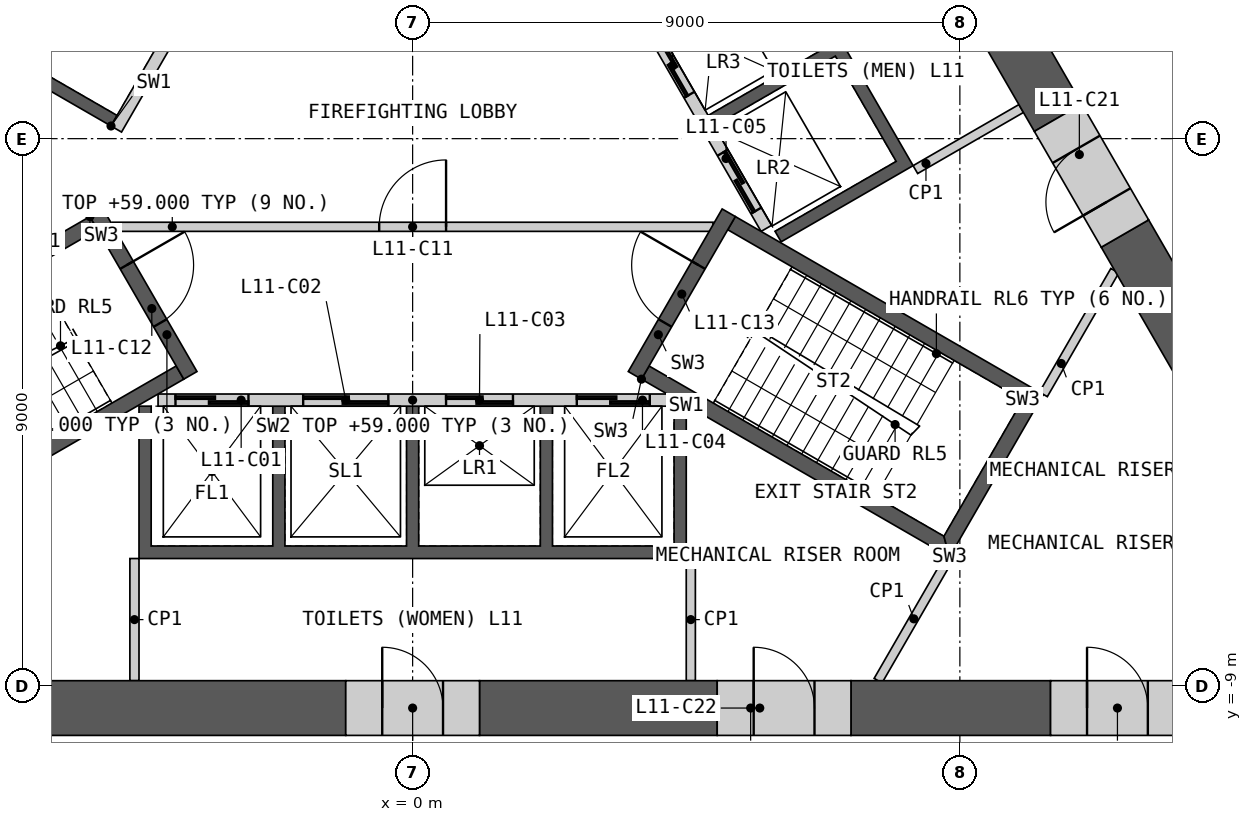
"""IFC4 building model, lengths in metres.
Left out: names, types, materials, properties, quantities, classifications, styles, units other than length and angle.
Written with IfcOpenShell. Run it as: python <this file> out.ifc"""

import sys

from ifc_helpers import new_model, si_unit, direction, frame, frame_2d, origin, place, context, subcontext, project, spatial, polyline, rectangle, outline, extrude, element, fill, save


model = new_model("IFC4")
c1 = context("Model", 3, precision=1e-05, world=origin(), true_north=direction((0.0, 1.0)))
c2 = subcontext(c1, "Body", "Model", "MODEL_VIEW")
j1 = project(units=[si_unit("LENGTHUNIT", "METRE"), si_unit("PLANEANGLEUNIT", "RADIAN")], contexts=[c1])
p1 = place(None, origin())
s1 = spatial("IfcSite", under=j1, at=p1, CompositionType="ELEMENT")
p2 = place(p1, origin())
s2 = spatial("IfcBuilding", under=s1, at=p2, CompositionType="ELEMENT")
p3 = place(p2, frame((0.0, 0.0, 55.2)))
s3 = spatial("IfcBuildingStorey", under=s2, at=p3, CompositionType="ELEMENT", Elevation=55.2)
p4 = place(p3, origin())
e1 = element("IfcWall", 1, at=p4, inside=s3, PredefinedType="SHEAR", context=c2, shape_type="SweptSolid", body=[
    extrude(outline(polyline([(4.5, -4.4), (4.5, -6.906), (-4.5, -6.906), (-4.5, -4.4), (-4.3, -4.4), (-4.3, -6.7), (-2.3, -6.7), (-2.3, -4.4), (-2.1, -4.4), (-2.1, -6.7), (-0.1, -6.7), (-0.1, -4.4), (0.1, -4.4), (0.1, -6.7), (2.1, -6.7), (2.1, -4.4), (2.3, -4.4), (2.3, -6.7), (4.3, -6.7), (4.3, -4.4), (4.5, -4.4)])), origin(), (0.0, 0.0, 1.0), 3.8),
])
p5 = place(p3, frame((-4.187, -4.3, 0.0), z_axis=(0.0, 0.0, 1.0), x_axis=(1.0, 0.0, 0.0)))
e2 = element("IfcWall", 2, at=p5, inside=s3, PredefinedType="SOLIDWALL", context=c2, shape_type="SweptSolid", body=[
    extrude(rectangle(XDim=8.373, YDim=0.2, at=frame_2d((4.187, 0.0))), origin(), (0.0, 0.0, 1.0), 3.8),
])
p6 = place(p5, frame((0.287, 0.0, 0.0)))
e3 = element("IfcOpeningElement", 3, at=p6, cuts=e2, PredefinedType="OPENING", context=c2, shape_type="SweptSolid", body=[
    extrude(rectangle(XDim=1.2, YDim=2.1, at=frame_2d((0.6, 1.05))), frame((0.0, 0.11, 0.0), z_axis=(0.0, -1.0, 0.0), x_axis=(1.0, 0.0, 0.0)), (0.0, 0.0, 1.0), 0.22),
])
p7 = place(p5, frame((2.387, 0.0, 0.0)))
e4 = element("IfcOpeningElement", 4, at=p7, cuts=e2, PredefinedType="OPENING", context=c2, shape_type="SweptSolid", body=[
    extrude(rectangle(XDim=1.4, YDim=2.1, at=frame_2d((0.7, 1.05))), frame((0.0, 0.11, 0.0), z_axis=(0.0, -1.0, 0.0), x_axis=(1.0, 0.0, 0.0)), (0.0, 0.0, 1.0), 0.22),
])
p8 = place(p5, frame((4.737, 0.0, 0.0)))
e5 = element("IfcOpeningElement", 5, at=p8, cuts=e2, PredefinedType="OPENING", context=c2, shape_type="SweptSolid", body=[
    extrude(rectangle(XDim=1.1, YDim=2.1, at=frame_2d((0.55, 1.05))), frame((0.0, 0.11, 0.0), z_axis=(0.0, -1.0, 0.0), x_axis=(1.0, 0.0, 0.0)), (0.0, 0.0, 1.0), 0.22),
])
p9 = place(p5, frame((6.887, 0.0, 0.0)))
e6 = element("IfcOpeningElement", 6, at=p9, cuts=e2, PredefinedType="OPENING", context=c2, shape_type="SweptSolid", body=[
    extrude(rectangle(XDim=1.2, YDim=2.1, at=frame_2d((0.6, 1.05))), frame((0.0, 0.11, 0.0), z_axis=(0.0, -1.0, 0.0), x_axis=(1.0, 0.0, 0.0)), (0.0, 0.0, 1.0), 0.22),
])
p10 = place(p3, origin())
e7 = element("IfcWall", 7, at=p10, inside=s3, PredefinedType="SHEAR", context=c2, shape_type="SweptSolid", body=[
    extrude(outline(polyline([(2.66, 4.192), (4.831, 5.445), (8.231, -0.444), (6.061, -1.697), (5.96, -1.524), (7.952, -0.374), (6.952, 1.358), (4.96, 0.208), (4.861, 0.381), (6.852, 1.531), (5.852, 3.263), (3.861, 2.113), (3.76, 2.287), (5.752, 3.437), (4.752, 5.169), (2.76, 4.019), (2.66, 4.192)])), origin(), (0.0, 0.0, 1.0), 3.8),
])
p11 = place(p3, frame((5.817, -1.476, 0.0), z_axis=(0.0, 0.0, 1.0), x_axis=(-0.500002616675, 0.866023893041, 0.0)))
e8 = element("IfcWall", 8, at=p11, inside=s3, PredefinedType="SOLIDWALL", context=c2, shape_type="SweptSolid", body=[
    extrude(rectangle(XDim=8.373, YDim=0.2, at=frame_2d((4.187, 0.0))), origin(), (0.0, 0.0, 1.0), 3.8),
])
p12 = place(p11, frame((0.337, 0.0, 0.0)))
e9 = element("IfcOpeningElement", 9, at=p12, cuts=e8, PredefinedType="OPENING", context=c2, shape_type="SweptSolid", body=[
    extrude(rectangle(XDim=1.1, YDim=2.1, at=frame_2d((0.55, 1.05))), frame((0.0, 0.11, 0.0), z_axis=(0.0, -1.0, 0.0), x_axis=(1.0, 0.0, 0.0)), (0.0, 0.0, 1.0), 0.22),
])
p13 = place(p11, frame((2.537, 0.0, 0.0)))
e10 = element("IfcOpeningElement", 10, at=p13, cuts=e8, PredefinedType="OPENING", context=c2, shape_type="SweptSolid", body=[
    extrude(rectangle(XDim=1.1, YDim=2.1, at=frame_2d((0.55, 1.05))), frame((0.0, 0.11, 0.0), z_axis=(0.0, -1.0, 0.0), x_axis=(1.0, 0.0, 0.0)), (0.0, 0.0, 1.0), 0.22),
])
p14 = place(p11, frame((4.737, 0.0, 0.0)))
e11 = element("IfcOpeningElement", 11, at=p14, cuts=e8, PredefinedType="OPENING", context=c2, shape_type="SweptSolid", body=[
    extrude(rectangle(XDim=1.1, YDim=2.1, at=frame_2d((0.55, 1.05))), frame((0.0, 0.11, 0.0), z_axis=(0.0, -1.0, 0.0), x_axis=(1.0, 0.0, 0.0)), (0.0, 0.0, 1.0), 0.22),
])
p15 = place(p11, frame((7.037, 0.0, 0.0)))
e12 = element("IfcOpeningElement", 12, at=p15, cuts=e8, PredefinedType="OPENING", context=c2, shape_type="SweptSolid", body=[
    extrude(rectangle(XDim=0.9, YDim=2.1, at=frame_2d((0.45, 1.05))), frame((0.0, 0.11, 0.0), z_axis=(0.0, -1.0, 0.0), x_axis=(1.0, 0.0, 0.0)), (0.0, 0.0, 1.0), 0.22),
])
p16 = place(p3, origin())
e13 = element("IfcWall", 13, at=p16, inside=s3, PredefinedType="SHEAR", context=c2, shape_type="SweptSolid", body=[
    extrude(outline(polyline([(-4.96, 0.208), (-7.131, 1.461), (-5.931, 3.54), (-3.76, 2.287), (-3.861, 2.113), (-5.852, 3.263), (-6.852, 1.531), (-4.861, 0.381), (-4.96, 0.208)])), origin(), (0.0, 0.0, 1.0), 3.8),
])
p17 = place(p3, frame((-1.631, 5.776, 0.0), z_axis=(0.0, 0.0, 1.0), x_axis=(-0.499992876559, -0.866029516466, 0.0)))
e14 = element("IfcWall", 14, at=p17, inside=s3, PredefinedType="SOLIDWALL", context=c2, shape_type="SweptSolid", body=[
    extrude(rectangle(XDim=6.486, YDim=0.2, at=frame_2d((3.243, 0.0))), origin(), (0.0, 0.0, 1.0), 3.8),
])
p18 = place(p17, frame((0.437, 0.0, 0.0)))
e15 = element("IfcOpeningElement", 15, at=p18, cuts=e14, PredefinedType="OPENING", context=c2, shape_type="SweptSolid", body=[
    extrude(rectangle(XDim=0.9, YDim=2.1, at=frame_2d((0.45, 1.05))), frame((0.0, 0.11, 0.0), z_axis=(0.0, -1.0, 0.0), x_axis=(1.0, 0.0, 0.0)), (0.0, 0.0, 1.0), 0.22),
])
p19 = place(p17, frame((2.637, 0.0, 0.0)))
e16 = element("IfcOpeningElement", 16, at=p19, cuts=e14, PredefinedType="OPENING", context=c2, shape_type="SweptSolid", body=[
    extrude(rectangle(XDim=0.9, YDim=2.1, at=frame_2d((0.45, 1.05))), frame((0.0, 0.11, 0.0), z_axis=(0.0, -1.0, 0.0), x_axis=(1.0, 0.0, 0.0)), (0.0, 0.0, 1.0), 0.22),
])
p20 = place(p3, frame((-4.941, -1.45, 0.0), z_axis=(0.0, 0.0, 1.0), x_axis=(1.0, 0.0, 0.0)))
e17 = element("IfcWall", 17, at=p20, inside=s3, PredefinedType="PARTITIONING", context=c2, shape_type="SweptSolid", body=[
    extrude(rectangle(XDim=9.882, YDim=0.15, at=frame_2d((4.941, 0.0))), origin(), (0.0, 0.0, 1.0), 3.8),
])
p21 = place(p20, frame((4.391, 0.0, 0.0)))
e18 = element("IfcOpeningElement", 18, at=p21, cuts=e17, PredefinedType="OPENING", context=c2, shape_type="SweptSolid", body=[
    extrude(rectangle(XDim=1.1, YDim=2.1, at=frame_2d((0.55, 1.05))), frame((0.0, 0.085, 0.0), z_axis=(0.0, -1.0, 0.0), x_axis=(1.0, 0.0, 0.0)), (0.0, 0.0, 1.0), 0.17),
])
p22 = place(p3, origin())
e19 = element("IfcWall", 19, at=p22, inside=s3, PredefinedType="SHEAR", context=c2, shape_type="SweptSolid", body=[
    extrude(outline(polyline([(-5.307, -1.281), (-10.374, -4.206), (-10.032, -4.298), (-5.182, -1.498), (-5.307, -1.281)])), origin(), (0.0, 0.0, 1.0), 3.8),
])
p23 = place(p3, origin())
e20 = element("IfcWall", 20, at=p23, inside=s3, PredefinedType="SHEAR", context=c2, shape_type="SweptSolid", body=[
    extrude(outline(polyline([(-8.738, -6.539), (-8.83, -6.881), (-3.763, -3.956), (-3.888, -3.739), (-8.738, -6.539)])), origin(), (0.0, 0.0, 1.0), 3.8),
])
p24 = place(p3, frame((-5.199, -1.219, 0.0), z_axis=(0.0, 0.0, 1.0), x_axis=(0.499982516597, -0.866035497597, 0.0)))
e21 = element("IfcWall", 21, at=p24, inside=s3, PredefinedType="SHEAR", context=c2, shape_type="SweptSolid", body=[
    extrude(rectangle(XDim=3.088, YDim=0.25, at=frame_2d((1.544, 0.0))), origin(), (0.0, 0.0, 1.0), 3.8),
])
p25 = place(p24, frame((0.994, 0.0, 0.0)))
e22 = element("IfcOpeningElement", 22, at=p25, cuts=e21, PredefinedType="OPENING", context=c2, shape_type="SweptSolid", body=[
    extrude(rectangle(XDim=1.1, YDim=2.1, at=frame_2d((0.55, 1.05))), frame((0.0, 0.135, 0.0), z_axis=(0.0, -1.0, 0.0), x_axis=(1.0, 0.0, 0.0)), (0.0, 0.0, 1.0), 0.27),
])
p26 = place(p3, origin())
e23 = element("IfcWall", 23, at=p26, inside=s3, PredefinedType="SHEAR", context=c2, shape_type="SweptSolid", body=[
    extrude(outline(polyline([(3.763, -3.956), (8.83, -6.881), (8.738, -6.539), (3.888, -3.739), (3.763, -3.956)])), origin(), (0.0, 0.0, 1.0), 3.8),
])
p27 = place(p3, origin())
e24 = element("IfcWall", 24, at=p27, inside=s3, PredefinedType="SHEAR", context=c2, shape_type="SweptSolid", body=[
    extrude(outline(polyline([(8.83, -6.881), (10.374, -4.206), (10.032, -4.298), (8.738, -6.539), (8.83, -6.881)])), origin(), (0.0, 0.0, 1.0), 3.8),
])
p28 = place(p3, origin())
e25 = element("IfcWall", 25, at=p28, inside=s3, PredefinedType="SHEAR", context=c2, shape_type="SweptSolid", body=[
    extrude(outline(polyline([(10.032, -4.298), (10.374, -4.206), (5.307, -1.281), (5.182, -1.498), (10.032, -4.298)])), origin(), (0.0, 0.0, 1.0), 3.8),
])
p29 = place(p3, frame((3.655, -3.893, 0.0), z_axis=(0.0, 0.0, 1.0), x_axis=(0.499982516597, 0.866035497597, 0.0)))
e26 = element("IfcWall", 26, at=p29, inside=s3, PredefinedType="SHEAR", context=c2, shape_type="SweptSolid", body=[
    extrude(rectangle(XDim=3.088, YDim=0.25, at=frame_2d((1.544, 0.0))), origin(), (0.0, 0.0, 1.0), 3.8),
])
p30 = place(p29, frame((0.994, 0.0, 0.0)))
e27 = element("IfcOpeningElement", 27, at=p30, cuts=e26, PredefinedType="OPENING", context=c2, shape_type="SweptSolid", body=[
    extrude(rectangle(XDim=1.1, YDim=2.1, at=frame_2d((0.55, 1.05))), frame((0.0, 0.135, 0.0), z_axis=(0.0, -1.0, 0.0), x_axis=(1.0, 0.0, 0.0)), (0.0, 0.0, 1.0), 0.27),
])
for number, where, z_axis, x_axis in (
    (28, (4.575, -6.906, 0.0), (0.0, 0.0, 1.0), (0.0, -1.0, 0.0)),
    (29, (-4.575, -6.906, 0.0), (0.0, 0.0, 1.0), (0.0, -1.0, 0.0)),
):
    element("IfcWall", number, at=place(p3, frame(where, z_axis=z_axis, x_axis=x_axis)), inside=s3, PredefinedType="PARTITIONING", context=c2, shape_type="SweptSolid", body=[
        extrude(rectangle(XDim=2.009, YDim=0.15, at=frame_2d((1.004, 0.0))), origin(), (0.0, 0.0, 1.0), 3.8),
    ])
p31 = place(p3, frame((8.268, -0.509, 0.0), z_axis=(0.0, 0.0, 1.0), x_axis=(0.866035824272, 0.499981950752, 0.0)))
e30 = element("IfcWall", 30, at=p31, inside=s3, PredefinedType="PARTITIONING", context=c2, shape_type="SweptSolid", body=[
    extrude(rectangle(XDim=2.009, YDim=0.15, at=frame_2d((1.004, 0.0))), origin(), (0.0, 0.0, 1.0), 3.8),
])
p32 = place(p3, frame((8.83, -6.881, 0.0), z_axis=(0.0, 0.0, 1.0), x_axis=(-0.500073279432, -0.865983091751, 0.0)))
e31 = element("IfcWall", 31, at=p32, inside=s3, PredefinedType="PARTITIONING", context=c2, shape_type="SweptSolid", body=[
    extrude(rectangle(XDim=2.349, YDim=0.15, at=frame_2d((1.175, 0.0))), origin(), (0.0, 0.0, 1.0), 3.8),
])
p33 = place(p3, frame((10.374, -4.206, 0.0), z_axis=(0.0, 0.0, 1.0), x_axis=(0.499995339376, 0.86602809458, 0.0)))
e32 = element("IfcWall", 32, at=p33, inside=s3, PredefinedType="PARTITIONING", context=c2, shape_type="SweptSolid", body=[
    extrude(rectangle(XDim=2.349, YDim=0.15, at=frame_2d((1.175, 0.0))), origin(), (0.0, 0.0, 1.0), 3.8),
])
p34 = place(p3, frame((-15.441, -9.365, 0.0), z_axis=(0.0, 0.0, 1.0), x_axis=(1.0, 0.0, 0.0)))
e33 = element("IfcWall", 33, at=p34, inside=s3, PredefinedType="SHEAR", context=c2, shape_type="SweptSolid", body=[
    extrude(rectangle(XDim=14.341, YDim=0.9, at=frame_2d((7.17, 0.0))), origin(), (0.0, 0.0, 1.0), 3.8),
])
p35 = place(p3, frame((1.1, -9.365, 0.0), z_axis=(0.0, 0.0, 1.0), x_axis=(1.0, 0.0, 0.0)))
e34 = element("IfcWall", 34, at=p35, inside=s3, PredefinedType="SHEAR", context=c2, shape_type="SweptSolid", body=[
    extrude(rectangle(XDim=3.909, YDim=0.9, at=frame_2d((1.955, 0.0))), origin(), (0.0, 0.0, 1.0), 3.8),
])
p36 = place(p3, frame((7.209, -9.365, 0.0), z_axis=(0.0, 0.0, 1.0), x_axis=(1.0, 0.0, 0.0)))
e35 = element("IfcWall", 35, at=p36, inside=s3, PredefinedType="SHEAR", context=c2, shape_type="SweptSolid", body=[
    extrude(rectangle(XDim=3.282, YDim=0.9, at=frame_2d((1.641, 0.0))), origin(), (0.0, 0.0, 1.0), 3.8),
])
p37 = place(p3, frame((15.831, -8.69, 0.0), z_axis=(0.0, 0.0, 1.0), x_axis=(-0.499995435471, 0.8660280391, 0.0)))
e36 = element("IfcWall", 36, at=p37, inside=s3, PredefinedType="SHEAR", context=c2, shape_type="SweptSolid", body=[
    extrude(rectangle(XDim=8.232, YDim=0.9, at=frame_2d((4.116, 0.0))), origin(), (0.0, 0.0, 1.0), 3.8),
])
p38 = place(p3, frame((10.615, 0.344, 0.0), z_axis=(0.0, 0.0, 1.0), x_axis=(-0.500044870432, 0.865999496279, 0.0)))
e37 = element("IfcWall", 37, at=p38, inside=s3, PredefinedType="SHEAR", context=c2, shape_type="SweptSolid", body=[
    extrude(rectangle(XDim=2.709, YDim=0.9, at=frame_2d((1.354, 0.0))), origin(), (0.0, 0.0, 1.0), 3.8),
])
p39 = place(p3, frame((-1.1, -9.365, 0.0), z_axis=(0.0, 0.0, 1.0), x_axis=(1.0, 0.0, 0.0)))
e38 = element("IfcWall", 38, at=p39, inside=s3, PredefinedType="SHEAR", context=c2, shape_type="SweptSolid", body=[
    extrude(rectangle(XDim=2.2, YDim=0.9, at=frame_2d((1.1, 0.0))), origin(), (0.0, 0.0, 1.0), 3.8),
])
p40 = place(p39, frame((0.6, 0.0, 0.0)))
e39 = element("IfcOpeningElement", 39, at=p40, cuts=e38, PredefinedType="OPENING", context=c2, shape_type="SweptSolid", body=[
    extrude(rectangle(XDim=1.0, YDim=2.1, at=frame_2d((0.5, 1.05))), frame((0.0, 0.46, 0.0), z_axis=(0.0, -1.0, 0.0), x_axis=(1.0, 0.0, 0.0)), (0.0, 0.0, 1.0), 0.92),
])
p41 = place(p3, frame((10.491, -9.365, 0.0), z_axis=(0.0, 0.0, 1.0), x_axis=(1.0, 0.0, 0.0)))
e40 = element("IfcWall", 40, at=p41, inside=s3, PredefinedType="SHEAR", context=c2, shape_type="SweptSolid", body=[
    extrude(rectangle(XDim=2.2, YDim=0.9, at=frame_2d((1.1, 0.0))), origin(), (0.0, 0.0, 1.0), 3.8),
])
p42 = place(p41, frame((0.6, 0.0, 0.0)))
e41 = element("IfcOpeningElement", 41, at=p42, cuts=e40, PredefinedType="OPENING", context=c2, shape_type="SweptSolid", body=[
    extrude(rectangle(XDim=1.0, YDim=2.1, at=frame_2d((0.5, 1.05))), frame((0.0, 0.46, 0.0), z_axis=(0.0, -1.0, 0.0), x_axis=(1.0, 0.0, 0.0)), (0.0, 0.0, 1.0), 0.92),
])
p43 = place(p3, frame((11.715, -1.561, 0.0), z_axis=(0.0, 0.0, 1.0), x_axis=(-0.499946605688, 0.86605622881, 0.0)))
e42 = element("IfcWall", 42, at=p43, inside=s3, PredefinedType="SHEAR", context=c2, shape_type="SweptSolid", body=[
    extrude(rectangle(XDim=2.2, YDim=0.9, at=frame_2d((1.1, 0.0))), origin(), (0.0, 0.0, 1.0), 3.8),
])
p44 = place(p43, frame((0.6, 0.0, 0.0)))
e43 = element("IfcOpeningElement", 43, at=p44, cuts=e42, PredefinedType="OPENING", context=c2, shape_type="SweptSolid", body=[
    extrude(rectangle(XDim=1.0, YDim=2.1, at=frame_2d((0.5, 1.05))), frame((0.0, 0.46, 0.0), z_axis=(0.0, -1.0, 0.0), x_axis=(1.0, 0.0, 0.0)), (0.0, 0.0, 1.0), 0.92),
])
p45 = place(p3, frame((5.009, -9.365, 0.0), z_axis=(0.0, 0.0, 1.0), x_axis=(1.0, 0.0, 0.0)))
e44 = element("IfcWall", 44, at=p45, inside=s3, PredefinedType="SHEAR", context=c2, shape_type="SweptSolid", body=[
    extrude(rectangle(XDim=2.2, YDim=0.9, at=frame_2d((1.1, 0.0))), origin(), (0.0, 0.0, 1.0), 3.8),
])
p46 = place(p45, frame((0.6, 0.0, 0.0)))
e45 = element("IfcOpeningElement", 45, at=p46, cuts=e44, PredefinedType="OPENING", context=c2, shape_type="SweptSolid", body=[
    extrude(rectangle(XDim=1.0, YDim=2.1, at=frame_2d((0.5, 1.05))), frame((0.0, 0.46, 0.0), z_axis=(0.0, -1.0, 0.0), x_axis=(1.0, 0.0, 0.0)), (0.0, 0.0, 1.0), 0.92),
])
p47 = place(p3, frame((10.719, 5.865, 0.0), z_axis=(0.0, 0.0, 1.0), x_axis=(0.49999175339, -0.866030164915, 0.0)))
e46 = element("IfcWall", 46, at=p47, inside=s3, PredefinedType="PARTITIONING", context=c2, shape_type="SweptSolid", body=[
    extrude(rectangle(XDim=10.019, YDim=0.2, at=frame_2d((5.009, 0.0))), origin(), (0.0, 0.0, 1.0), 3.8),
])
p48 = place(p47, frame((4.585, 0.0, 0.0)))
e47 = element("IfcOpeningElement", 47, at=p48, cuts=e46, PredefinedType="OPENING", context=c2, shape_type="SweptSolid", body=[
    extrude(rectangle(XDim=0.95, YDim=2.1, at=frame_2d((0.475, 1.05))), frame((0.0, 0.11, 0.0), z_axis=(0.0, -1.0, 0.0), x_axis=(1.0, 0.0, 0.0)), (0.0, 0.0, 1.0), 0.22),
])
p49 = place(p6, origin())
e48 = element("IfcDoor", 48, at=p49, inside=s3, OperationType="SLIDING_TO_LEFT", PredefinedType="DOOR", context=c2, shape_type="SweptSolid", body=[
    extrude(rectangle(XDim=1.2, YDim=2.1, at=frame_2d((0.6, 1.05))), frame((0.0, 0.025, 0.0), z_axis=(0.0, -1.0, 0.0), x_axis=(1.0, 0.0, 0.0)), (0.0, 0.0, 1.0), 0.05),
])
fill(e3, e48)
p50 = place(p7, origin())
e49 = element("IfcDoor", 49, at=p50, inside=s3, OperationType="SLIDING_TO_LEFT", PredefinedType="DOOR", context=c2, shape_type="SweptSolid", body=[
    extrude(rectangle(XDim=1.4, YDim=2.1, at=frame_2d((0.7, 1.05))), frame((0.0, 0.025, 0.0), z_axis=(0.0, -1.0, 0.0), x_axis=(1.0, 0.0, 0.0)), (0.0, 0.0, 1.0), 0.05),
])
fill(e4, e49)
p51 = place(p8, origin())
e50 = element("IfcDoor", 50, at=p51, inside=s3, OperationType="SLIDING_TO_LEFT", PredefinedType="DOOR", context=c2, shape_type="SweptSolid", body=[
    extrude(rectangle(XDim=1.1, YDim=2.1, at=frame_2d((0.55, 1.05))), frame((0.0, 0.025, 0.0), z_axis=(0.0, -1.0, 0.0), x_axis=(1.0, 0.0, 0.0)), (0.0, 0.0, 1.0), 0.05),
])
fill(e5, e50)
p52 = place(p9, origin())
e51 = element("IfcDoor", 51, at=p52, inside=s3, OperationType="SLIDING_TO_LEFT", PredefinedType="DOOR", context=c2, shape_type="SweptSolid", body=[
    extrude(rectangle(XDim=1.2, YDim=2.1, at=frame_2d((0.6, 1.05))), frame((0.0, 0.025, 0.0), z_axis=(0.0, -1.0, 0.0), x_axis=(1.0, 0.0, 0.0)), (0.0, 0.0, 1.0), 0.05),
])
fill(e6, e51)
p53 = place(p12, origin())
e52 = element("IfcDoor", 52, at=p53, inside=s3, OperationType="SLIDING_TO_LEFT", PredefinedType="DOOR", context=c2, shape_type="SweptSolid", body=[
    extrude(rectangle(XDim=1.1, YDim=2.1, at=frame_2d((0.55, 1.05))), frame((0.0, 0.025, 0.0), z_axis=(0.0, -1.0, 0.0), x_axis=(1.0, 0.0, 0.0)), (0.0, 0.0, 1.0), 0.05),
])
fill(e9, e52)
p54 = place(p13, origin())
e53 = element("IfcDoor", 53, at=p54, inside=s3, OperationType="SLIDING_TO_LEFT", PredefinedType="DOOR", context=c2, shape_type="SweptSolid", body=[
    extrude(rectangle(XDim=1.1, YDim=2.1, at=frame_2d((0.55, 1.05))), frame((0.0, 0.025, 0.0), z_axis=(0.0, -1.0, 0.0), x_axis=(1.0, 0.0, 0.0)), (0.0, 0.0, 1.0), 0.05),
])
fill(e10, e53)
p55 = place(p21, origin())
e54 = element("IfcDoor", 54, at=p55, inside=s3, OperationType="SINGLE_SWING_RIGHT", PredefinedType="DOOR", context=c2, shape_type="SweptSolid", body=[
    extrude(rectangle(XDim=1.1, YDim=2.1, at=frame_2d((0.55, 1.05))), frame((0.0, 0.025, 0.0), z_axis=(0.0, -1.0, 0.0), x_axis=(1.0, 0.0, 0.0)), (0.0, 0.0, 1.0), 0.05),
])
fill(e18, e54)
p56 = place(p25, origin())
e55 = element("IfcDoor", 55, at=p56, inside=s3, OperationType="SINGLE_SWING_LEFT", PredefinedType="DOOR", context=c2, shape_type="SweptSolid", body=[
    extrude(rectangle(XDim=1.1, YDim=2.1, at=frame_2d((0.55, 1.05))), frame((0.0, 0.025, 0.0), z_axis=(0.0, -1.0, 0.0), x_axis=(1.0, 0.0, 0.0)), (0.0, 0.0, 1.0), 0.05),
])
fill(e22, e55)
p57 = place(p30, origin())
e56 = element("IfcDoor", 56, at=p57, inside=s3, OperationType="SINGLE_SWING_RIGHT", PredefinedType="DOOR", context=c2, shape_type="SweptSolid", body=[
    extrude(rectangle(XDim=1.1, YDim=2.1, at=frame_2d((0.55, 1.05))), frame((0.0, 0.025, 0.0), z_axis=(0.0, -1.0, 0.0), x_axis=(1.0, 0.0, 0.0)), (0.0, 0.0, 1.0), 0.05),
])
fill(e27, e56)
p58 = place(p40, origin())
e57 = element("IfcDoor", 57, at=p58, inside=s3, OperationType="SINGLE_SWING_LEFT", PredefinedType="DOOR", context=c2, shape_type="SweptSolid", body=[
    extrude(rectangle(XDim=1.0, YDim=2.1, at=frame_2d((0.5, 1.05))), frame((0.0, 0.205, 0.0), z_axis=(0.0, -1.0, 0.0), x_axis=(1.0, 0.0, 0.0)), (0.0, 0.0, 1.0), 0.05),
])
fill(e39, e57)
p59 = place(p42, origin())
e58 = element("IfcDoor", 58, at=p59, inside=s3, OperationType="SINGLE_SWING_LEFT", PredefinedType="DOOR", context=c2, shape_type="SweptSolid", body=[
    extrude(rectangle(XDim=1.0, YDim=2.1, at=frame_2d((0.5, 1.05))), frame((0.0, 0.205, 0.0), z_axis=(0.0, -1.0, 0.0), x_axis=(1.0, 0.0, 0.0)), (0.0, 0.0, 1.0), 0.05),
])
fill(e41, e58)
p60 = place(p44, origin())
e59 = element("IfcDoor", 59, at=p60, inside=s3, OperationType="SINGLE_SWING_LEFT", PredefinedType="DOOR", context=c2, shape_type="SweptSolid", body=[
    extrude(rectangle(XDim=1.0, YDim=2.1, at=frame_2d((0.5, 1.05))), frame((0.0, 0.205, 0.0), z_axis=(0.0, -1.0, 0.0), x_axis=(1.0, 0.0, 0.0)), (0.0, 0.0, 1.0), 0.05),
])
fill(e43, e59)
p61 = place(p46, origin())
e60 = element("IfcDoor", 60, at=p61, inside=s3, OperationType="SINGLE_SWING_LEFT", PredefinedType="DOOR", context=c2, shape_type="SweptSolid", body=[
    extrude(rectangle(XDim=1.0, YDim=2.1, at=frame_2d((0.5, 1.05))), frame((0.0, 0.205, 0.0), z_axis=(0.0, -1.0, 0.0), x_axis=(1.0, 0.0, 0.0)), (0.0, 0.0, 1.0), 0.05),
])
fill(e45, e60)
save(model, sys.argv[1])
